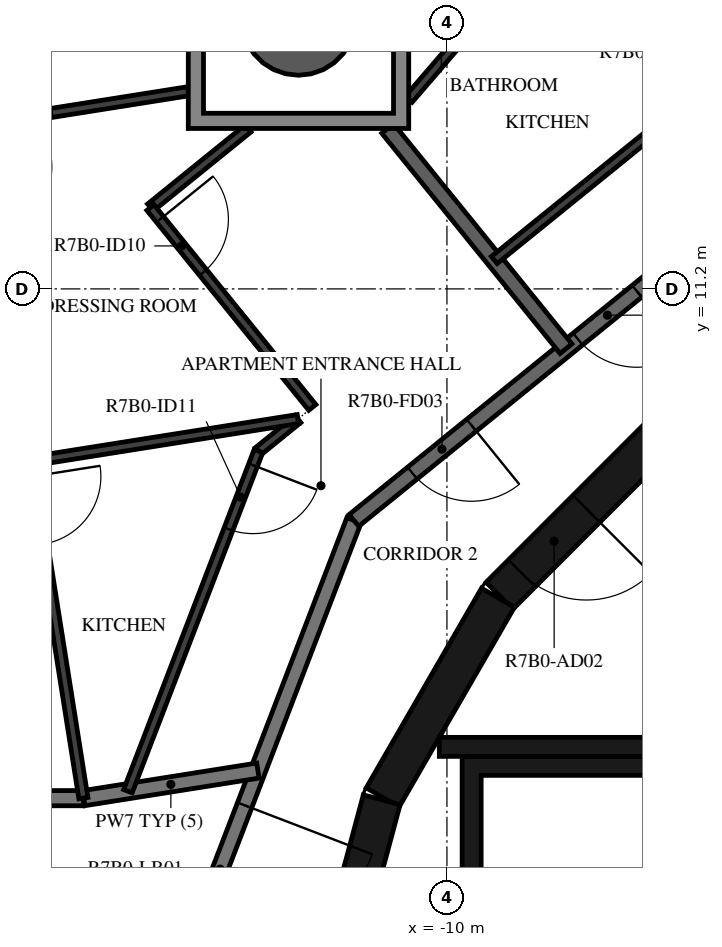
"""IFC4 building model, lengths in metres.
Left out: names, types, materials, properties, quantities, classifications, styles, units other than length and angle.
Written with IfcOpenShell. Run it as: python <this file> out.ifc"""

import sys

from ifc_helpers import new_model, si_unit, direction, frame, frame_2d, origin, origin_2d, place, context, subcontext, project, spatial, polyline, rectangle, hollow_circle, outline, extrude, element, fill, save


model = new_model("IFC4")
c1 = context("Model", 3, precision=1e-05, world=origin(), true_north=direction((0.0, 1.0)))
c2 = subcontext(c1, "Body", "Model", "MODEL_VIEW")
j1 = project(units=[si_unit("LENGTHUNIT", "METRE"), si_unit("PLANEANGLEUNIT", "RADIAN")], contexts=[c1])
p1 = place(None, origin())
s1 = spatial("IfcSite", under=j1, at=p1, CompositionType="ELEMENT")
p2 = place(p1, origin())
s2 = spatial("IfcBuilding", under=s1, at=p2, CompositionType="ELEMENT")
p3 = place(p2, frame((0.0, 0.0, 277.4)))
s3 = spatial("IfcBuildingStorey", under=s2, at=p3, CompositionType="ELEMENT", Elevation=277.4)
p4 = place(p3, frame((-11.953, 14.76, -0.38), z_axis=(0.0, 0.0, 1.0), x_axis=(1.0, 0.0, 0.0)))
e1 = element("IfcColumn", 1, at=p4, inside=s3, PredefinedType="COLUMN", context=c2, shape_type="SweptSolid", body=[
    extrude(hollow_circle(Radius=0.75, WallThickness=0.035, at=origin_2d()), origin(), (0.0, 0.0, 1.0), 3.5),
])
p5 = place(p3, frame((-7.164, 9.308, 0.0), z_axis=(0.0, 0.0, 1.0), x_axis=(-0.707106781187, -0.707106781187, 0.0)))
e2 = element("IfcWall", 2, at=p5, inside=s3, PredefinedType="SHEAR", context=c2, shape_type="SweptSolid", body=[
    extrude(rectangle(XDim=3.032, YDim=0.5, at=frame_2d((1.516, 0.0))), origin(), (0.0, 0.0, 1.0), 3.12),
])
p6 = place(p5, frame((1.416, 0.0, 0.0)))
e3 = element("IfcOpeningElement", 3, at=p6, cuts=e2, PredefinedType="OPENING", context=c2, shape_type="SweptSolid", body=[
    extrude(rectangle(XDim=1.2, YDim=2.1, at=frame_2d((0.6, 1.05))), frame((0.0, 0.26, 0.0), z_axis=(0.0, -1.0, 0.0), x_axis=(1.0, 0.0, 0.0)), (0.0, 0.0, 1.0), 0.52),
])
for number, where, z_axis, x_axis in (
    (4, (-9.329, 7.137, 0.0), (0.0, 0.0, 1.0), (-0.5, -0.866, 0.0)),
    (5, (-10.858, 4.479, 0.0), (0.0, 0.0, 1.0), (-0.259, -0.966, 0.0)),
):
    element("IfcWall", number, at=place(p3, frame(where, z_axis=z_axis, x_axis=x_axis)), inside=s3, PredefinedType="SHEAR", context=c2, shape_type="SweptSolid", body=[
        extrude(rectangle(XDim=3.033, YDim=0.5, at=frame_2d((1.516, 0.0))), origin(), (0.0, 0.0, 1.0), 3.12),
    ])
p7 = place(p3, frame((-7.0, 5.175, 0.0), z_axis=(0.0, 0.0, 1.0), x_axis=(-1.0, 0.0, 0.0)))
e6 = element("IfcWall", 6, at=p7, inside=s3, PredefinedType="SHEAR", context=c2, shape_type="SweptSolid", body=[
    extrude(rectangle(XDim=3.1, YDim=0.25, at=frame_2d((1.55, 0.0))), origin(), (0.0, 0.0, 1.0), 3.12),
])
p8 = place(p3, origin())
e7 = element("IfcWall", 7, at=p8, inside=s3, PredefinedType="SHEAR", context=c2, shape_type="SweptSolid", body=[
    extrude(outline(polyline([(-7.148, 8.97), (-7.0, 8.97), (-7.0, 8.67), (-7.448, 8.67), (-7.148, 8.97)])), origin(), (0.0, 0.0, 1.0), 3.12),
])
p9 = place(p3, origin())
e8 = element("IfcWall", 8, at=p9, inside=s3, PredefinedType="SHEAR", context=c2, shape_type="SweptSolid", body=[
    extrude(outline(polyline([(-9.8, 1.9), (-9.55, 1.9), (-9.55, 4.8), (-5.5, 4.8), (-5.5, 1.9), (-5.25, 1.9), (-5.25, 4.8), (3.1, 4.8), (3.1, 1.9), (3.35, 1.9), (3.35, 4.8), (5.25, 4.8), (5.25, 1.9), (5.5, 1.9), (5.5, 4.8), (7.4, 4.8), (7.4, 1.9), (7.65, 1.9), (7.65, 4.8), (9.55, 4.8), (9.55, 1.9), (9.8, 1.9), (9.8, 4.8), (9.8, 5.05), (-9.8, 5.05), (-9.8, 4.8), (-9.8, 1.9)])), origin(), (0.0, 0.0, 1.0), 3.12),
])
p10 = place(p3, frame((-11.223, 8.154, 0.0), z_axis=(0.0, 0.0, 1.0), x_axis=(-0.358341090983, -0.93359073609, 0.0)))
e9 = element("IfcWall", 9, at=p10, inside=s3, PredefinedType="STANDARD", context=c2, shape_type="SweptSolid", body=[
    extrude(rectangle(XDim=7.181, YDim=0.2, at=frame_2d((3.59, 0.0))), origin(), (0.0, 0.0, 1.0), 3.12),
])
p11 = place(p10, frame((4.014, 0.0, 0.0)))
e10 = element("IfcOpeningElement", 10, at=p11, cuts=e9, PredefinedType="OPENING", context=c2, shape_type="SweptSolid", body=[
    extrude(rectangle(XDim=1.8, YDim=2.1, at=frame_2d((0.9, 1.05))), frame((0.0, 0.11, 0.0), z_axis=(0.0, -1.0, 0.0), x_axis=(1.0, 0.0, 0.0)), (0.0, 0.0, 1.0), 0.22),
])
p12 = place(p3, frame((-5.643, 12.673, 0.0), z_axis=(0.0, 0.0, 1.0), x_axis=(-0.777160148113, -0.629302871585, 0.0)))
e11 = element("IfcWall", 11, at=p12, inside=s3, PredefinedType="STANDARD", context=c2, shape_type="SweptSolid", body=[
    extrude(rectangle(XDim=7.181, YDim=0.2, at=frame_2d((3.59, 0.0))), origin(), (0.0, 0.0, 1.0), 3.12),
])
p13 = place(p12, frame((2.39, 0.0, 0.0)))
e12 = element("IfcOpeningElement", 12, at=p13, cuts=e11, PredefinedType="OPENING", context=c2, shape_type="SweptSolid", body=[
    extrude(rectangle(XDim=1.0, YDim=2.1, at=frame_2d((0.5, 1.05))), frame((0.0, 0.11, 0.0), z_axis=(0.0, -1.0, 0.0), x_axis=(1.0, 0.0, 0.0)), (0.0, 0.0, 1.0), 0.22),
])
p14 = place(p12, frame((5.192, 0.0, 0.0)))
e13 = element("IfcOpeningElement", 13, at=p14, cuts=e11, PredefinedType="OPENING", context=c2, shape_type="SweptSolid", body=[
    extrude(rectangle(XDim=1.0, YDim=2.1, at=frame_2d((0.5, 1.05))), frame((0.0, 0.11, 0.0), z_axis=(0.0, -1.0, 0.0), x_axis=(1.0, 0.0, 0.0)), (0.0, 0.0, 1.0), 0.22),
])
p15 = place(p3, frame((-12.487, 4.863, 0.0), z_axis=(0.0, 0.0, 1.0), x_axis=(-0.98769031179, -0.156422018898, 0.0)))
e14 = element("IfcWall", 14, at=p15, inside=s3, PredefinedType="STANDARD", context=c2, shape_type="SweptSolid", body=[
    extrude(rectangle(XDim=2.319, YDim=0.2, at=frame_2d((1.16, 0.0))), origin(), (0.0, 0.0, 1.0), 3.12),
])
p16 = place(p3, frame((-14.783, 4.5, 0.0), z_axis=(0.0, 0.0, 1.0), x_axis=(-1.0, 0.0, 0.0)))
e15 = element("IfcWall", 15, at=p16, inside=s3, PredefinedType="STANDARD", context=c2, shape_type="SweptSolid", body=[
    extrude(rectangle(XDim=3.645, YDim=0.2, at=frame_2d((1.822, 0.0))), origin(), (0.0, 0.0, 1.0), 3.12),
])
p17 = place(p3, frame((-10.779, 13.31, 0.0), z_axis=(0.0, 0.0, 1.0), x_axis=(0.62931692753, -0.777148766147, 0.0)))
e16 = element("IfcWall", 16, at=p17, inside=s3, PredefinedType="STANDARD", context=c2, shape_type="SweptSolid", body=[
    extrude(rectangle(XDim=3.727, YDim=0.2, at=frame_2d((1.864, 0.0))), origin(), (0.0, 0.0, 1.0), 3.12),
])
p18 = place(p3, frame((-6.274, 14.092, 0.0), z_axis=(0.0, 0.0, 1.0), x_axis=(-0.777162268892, -0.629300252511, 0.0)))
e17 = element("IfcWall", 17, at=p18, inside=s3, PredefinedType="PARTITIONING", context=c2, shape_type="SweptSolid", body=[
    extrude(rectangle(XDim=3.992, YDim=0.12, at=frame_2d((1.996, 0.0))), origin(), (0.0, 0.0, 1.0), 3.12),
])
p19 = place(p18, frame((0.2, 0.0, 0.0)))
e18 = element("IfcOpeningElement", 18, at=p19, cuts=e17, PredefinedType="OPENING", context=c2, shape_type="SweptSolid", body=[
    extrude(rectangle(XDim=0.9, YDim=2.1, at=frame_2d((0.45, 1.05))), frame((0.0, 0.07, 0.0), z_axis=(0.0, -1.0, 0.0), x_axis=(1.0, 0.0, 0.0)), (0.0, 0.0, 1.0), 0.14),
])
p20 = place(p3, frame((-10.91, 16.502, 0.0), z_axis=(0.0, 0.0, 1.0), x_axis=(0.933584453869, -0.358357457707, 0.0)))
e19 = element("IfcWall", 19, at=p20, inside=s3, PredefinedType="PARTITIONING", context=c2, shape_type="SweptSolid", body=[
    extrude(rectangle(XDim=6.212, YDim=0.12, at=frame_2d((3.106, 0.0))), origin(), (0.0, 0.0, 1.0), 3.12),
])
p21 = place(p20, frame((2.657, 0.0, 0.0)))
e20 = element("IfcOpeningElement", 20, at=p21, cuts=e19, PredefinedType="OPENING", context=c2, shape_type="SweptSolid", body=[
    extrude(rectangle(XDim=0.9, YDim=2.1, at=frame_2d((0.45, 1.05))), frame((0.0, 0.07, 0.0), z_axis=(0.0, -1.0, 0.0), x_axis=(1.0, 0.0, 0.0)), (0.0, 0.0, 1.0), 0.14),
])
p22 = place(p3, frame((-8.788, 15.688, 0.0), z_axis=(0.0, 0.0, 1.0), x_axis=(-0.652090514391, -0.758141122115, 0.0)))
e21 = element("IfcWall", 21, at=p22, inside=s3, PredefinedType="PARTITIONING", context=c2, shape_type="SweptSolid", body=[
    extrude(rectangle(XDim=2.629, YDim=0.12, at=frame_2d((1.314, 0.0))), origin(), (0.0, 0.0, 1.0), 3.12),
])
p23 = place(p22, frame((0.2, 0.0, 0.0)))
e22 = element("IfcOpeningElement", 22, at=p23, cuts=e21, PredefinedType="OPENING", context=c2, shape_type="SweptSolid", body=[
    extrude(rectangle(XDim=0.8, YDim=2.1, at=frame_2d((0.4, 1.05))), frame((0.0, 0.07, 0.0), z_axis=(0.0, -1.0, 0.0), x_axis=(1.0, 0.0, 0.0)), (0.0, 0.0, 1.0), 0.14),
])
p24 = place(p3, frame((-12.616, 13.311, 0.0), z_axis=(0.0, 0.0, 1.0), x_axis=(-0.7771657422, -0.629295963082, 0.0)))
e23 = element("IfcWall", 23, at=p24, inside=s3, PredefinedType="PARTITIONING", context=c2, shape_type="SweptSolid", body=[
    extrude(rectangle(XDim=1.653, YDim=0.12, at=frame_2d((0.826, 0.0))), origin(), (0.0, 0.0, 1.0), 3.12),
])
p25 = place(p3, frame((-13.901, 12.271, 0.0), z_axis=(0.0, 0.0, 1.0), x_axis=(0.62932066967, -0.777145735835, 0.0)))
e24 = element("IfcWall", 24, at=p25, inside=s3, PredefinedType="PARTITIONING", context=c2, shape_type="SweptSolid", body=[
    extrude(rectangle(XDim=3.384, YDim=0.12, at=frame_2d((1.692, 0.0))), origin(), (0.0, 0.0, 1.0), 3.12),
])
p26 = place(p25, frame((0.2, 0.0, 0.0)))
e25 = element("IfcOpeningElement", 25, at=p26, cuts=e24, PredefinedType="OPENING", context=c2, shape_type="SweptSolid", body=[
    extrude(rectangle(XDim=0.9, YDim=2.1, at=frame_2d((0.45, 1.05))), frame((0.0, 0.07, 0.0), z_axis=(0.0, -1.0, 0.0), x_axis=(1.0, 0.0, 0.0)), (0.0, 0.0, 1.0), 0.14),
])
p27 = place(p3, frame((-11.96, 9.487, 0.0), z_axis=(0.0, 0.0, 1.0), x_axis=(-0.777219341678, -0.62922976322, 0.0)))
e26 = element("IfcWall", 26, at=p27, inside=s3, PredefinedType="PARTITIONING", context=c2, shape_type="SweptSolid", body=[
    extrude(rectangle(XDim=0.668, YDim=0.12, at=frame_2d((0.334, 0.0))), origin(), (0.0, 0.0, 1.0), 3.12),
])
p28 = place(p3, frame((-12.479, 9.067, 0.0), z_axis=(0.0, 0.0, 1.0), x_axis=(-0.358402229057, -0.933567267104, 0.0)))
e27 = element("IfcWall", 27, at=p28, inside=s3, PredefinedType="PARTITIONING", context=c2, shape_type="SweptSolid", body=[
    extrude(rectangle(XDim=4.793, YDim=0.12, at=frame_2d((2.397, 0.0))), origin(), (0.0, 0.0, 1.0), 3.12),
])
p29 = place(p28, frame((0.2, 0.0, 0.0)))
e28 = element("IfcOpeningElement", 28, at=p29, cuts=e27, PredefinedType="OPENING", context=c2, shape_type="SweptSolid", body=[
    extrude(rectangle(XDim=0.9, YDim=2.1, at=frame_2d((0.45, 1.05))), frame((0.0, 0.07, 0.0), z_axis=(0.0, -1.0, 0.0), x_axis=(1.0, 0.0, 0.0)), (0.0, 0.0, 1.0), 0.14),
])
p30 = place(p3, frame((-16.186, 13.359, 0.0), z_axis=(0.0, 0.0, 1.0), x_axis=(0.987680631298, 0.156483131865, 0.0)))
e29 = element("IfcWall", 29, at=p30, inside=s3, PredefinedType="PARTITIONING", context=c2, shape_type="SweptSolid", body=[
    extrude(rectangle(XDim=2.818, YDim=0.12, at=frame_2d((1.409, 0.0))), origin(), (0.0, 0.0, 1.0), 3.12),
])
p31 = place(p30, frame((0.2, 0.0, 0.0)))
e30 = element("IfcOpeningElement", 30, at=p31, cuts=e29, PredefinedType="OPENING", context=c2, shape_type="SweptSolid", body=[
    extrude(rectangle(XDim=0.8, YDim=2.1, at=frame_2d((0.4, 1.05))), frame((0.0, 0.07, 0.0), z_axis=(0.0, -1.0, 0.0), x_axis=(1.0, 0.0, 0.0)), (0.0, 0.0, 1.0), 0.14),
])
p32 = place(p3, frame((-16.192, 13.399, 0.0), z_axis=(0.0, 0.0, 1.0), x_axis=(0.156405047803, -0.987692999379, 0.0)))
e31 = element("IfcWall", 31, at=p32, inside=s3, PredefinedType="PARTITIONING", context=c2, shape_type="SweptSolid", body=[
    extrude(rectangle(XDim=9.01, YDim=0.12, at=frame_2d((4.505, 0.0))), origin(), (0.0, 0.0, 1.0), 3.12),
])
p33 = place(p32, frame((0.6, 0.0, 0.0)))
e32 = element("IfcOpeningElement", 32, at=p33, cuts=e31, PredefinedType="OPENING", context=c2, shape_type="SweptSolid", body=[
    extrude(rectangle(XDim=0.9, YDim=2.1, at=frame_2d((0.45, 1.05))), frame((0.0, 0.07, 0.0), z_axis=(0.0, -1.0, 0.0), x_axis=(1.0, 0.0, 0.0)), (0.0, 0.0, 1.0), 0.14),
])
p34 = place(p32, frame((4.725, 0.0, 0.0)))
e33 = element("IfcOpeningElement", 33, at=p34, cuts=e31, PredefinedType="OPENING", context=c2, shape_type="SweptSolid", body=[
    extrude(rectangle(XDim=0.9, YDim=2.1, at=frame_2d((0.45, 1.05))), frame((0.0, 0.07, 0.0), z_axis=(0.0, -1.0, 0.0), x_axis=(1.0, 0.0, 0.0)), (0.0, 0.0, 1.0), 0.14),
])
p35 = place(p3, frame((-15.484, 8.929, 0.0), z_axis=(0.0, 0.0, 1.0), x_axis=(0.987689619983, 0.156426387092, 0.0)))
e34 = element("IfcWall", 34, at=p35, inside=s3, PredefinedType="PARTITIONING", context=c2, shape_type="SweptSolid", body=[
    extrude(rectangle(XDim=3.568, YDim=0.12, at=frame_2d((1.784, 0.0))), origin(), (0.0, 0.0, 1.0), 3.12),
])
p36 = place(p3, origin())
e35 = element("IfcWall", 35, at=p36, inside=s3, PredefinedType="STANDARD", context=c2, shape_type="SweptSolid", body=[
    extrude(outline(polyline([(-10.503, 16.21), (-10.503, 13.311), (-13.403, 13.311), (-13.403, 16.21), (-10.503, 16.21)]), holes=[polyline([(-13.203, 13.51), (-10.703, 13.51), (-10.703, 16.01), (-13.203, 16.01), (-13.203, 13.51)])]), origin(), (0.0, 0.0, 1.0), 3.12),
])
p37 = place(p6, origin())
e36 = element("IfcDoor", 36, at=p37, inside=s3, OperationType="SINGLE_SWING_RIGHT", PredefinedType="DOOR", context=c2, shape_type="SweptSolid", body=[
    extrude(rectangle(XDim=1.2, YDim=2.1, at=frame_2d((0.6, 1.05))), frame((0.0, 0.025, 0.0), z_axis=(0.0, -1.0, 0.0), x_axis=(1.0, 0.0, 0.0)), (0.0, 0.0, 1.0), 0.05),
])
fill(e3, e36)
p38 = place(p13, origin())
e37 = element("IfcDoor", 37, at=p38, inside=s3, OperationType="SINGLE_SWING_RIGHT", PredefinedType="DOOR", context=c2, shape_type="SweptSolid", body=[
    extrude(rectangle(XDim=1.0, YDim=2.1, at=frame_2d((0.5, 1.05))), frame((0.0, 0.025, 0.0), z_axis=(0.0, -1.0, 0.0), x_axis=(1.0, 0.0, 0.0)), (0.0, 0.0, 1.0), 0.05),
])
fill(e12, e37)
p39 = place(p14, origin())
e38 = element("IfcDoor", 38, at=p39, inside=s3, OperationType="SINGLE_SWING_LEFT", PredefinedType="DOOR", context=c2, shape_type="SweptSolid", body=[
    extrude(rectangle(XDim=1.0, YDim=2.1, at=frame_2d((0.5, 1.05))), frame((0.0, 0.025, 0.0), z_axis=(0.0, -1.0, 0.0), x_axis=(1.0, 0.0, 0.0)), (0.0, 0.0, 1.0), 0.05),
])
fill(e13, e38)
p40 = place(p26, origin())
e39 = element("IfcDoor", 39, at=p40, inside=s3, OperationType="SINGLE_SWING_LEFT", PredefinedType="DOOR", context=c2, shape_type="SweptSolid", body=[
    extrude(rectangle(XDim=0.9, YDim=2.1, at=frame_2d((0.45, 1.05))), frame((0.0, 0.025, 0.0), z_axis=(0.0, -1.0, 0.0), x_axis=(1.0, 0.0, 0.0)), (0.0, 0.0, 1.0), 0.05),
])
fill(e25, e39)
p41 = place(p29, origin())
e40 = element("IfcDoor", 40, at=p41, inside=s3, OperationType="SINGLE_SWING_LEFT", PredefinedType="DOOR", context=c2, shape_type="SweptSolid", body=[
    extrude(rectangle(XDim=0.9, YDim=2.1, at=frame_2d((0.45, 1.05))), frame((0.0, 0.025, 0.0), z_axis=(0.0, -1.0, 0.0), x_axis=(1.0, 0.0, 0.0)), (0.0, 0.0, 1.0), 0.05),
])
fill(e28, e40)
p42 = place(p31, origin())
e41 = element("IfcDoor", 41, at=p42, inside=s3, OperationType="SINGLE_SWING_LEFT", PredefinedType="DOOR", context=c2, shape_type="SweptSolid", body=[
    extrude(rectangle(XDim=0.8, YDim=2.1, at=frame_2d((0.4, 1.05))), frame((0.0, 0.025, 0.0), z_axis=(0.0, -1.0, 0.0), x_axis=(1.0, 0.0, 0.0)), (0.0, 0.0, 1.0), 0.05),
])
fill(e30, e41)
p43 = place(p11, origin())
e42 = element("IfcDoor", 42, at=p43, inside=s3, OperationType="DOUBLE_DOOR_SINGLE_SWING", PredefinedType="DOOR", context=c2, shape_type="SweptSolid", body=[
    extrude(rectangle(XDim=1.8, YDim=2.1, at=frame_2d((0.9, 1.05))), frame((0.0, 0.025, 0.0), z_axis=(0.0, -1.0, 0.0), x_axis=(1.0, 0.0, 0.0)), (0.0, 0.0, 1.0), 0.05),
])
fill(e10, e42)
save(model, sys.argv[1])
